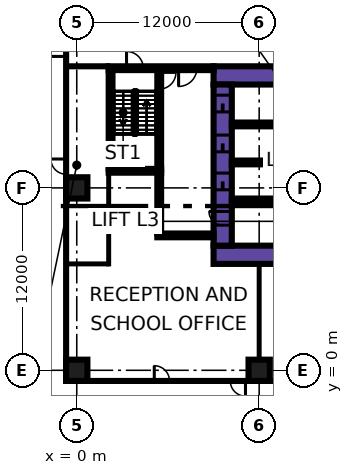
"""IFC4 building model, lengths in metres.
Left out: names, types, materials, properties, quantities, classifications, styles, units other than length and angle.
Written with IfcOpenShell. Run it as: python <this file> out.ifc"""

import sys

from ifc_helpers import new_model, si_unit, direction, frame, frame_2d, origin, origin_2d, place, context, subcontext, project, spatial, rectangle, extrude, element, fill, save


model = new_model("IFC4")
c1 = context("Model", 3, precision=1e-05, world=origin(), true_north=direction((0.0, 1.0)))
c2 = subcontext(c1, "Body", "Model", "MODEL_VIEW")
j1 = project(units=[si_unit("LENGTHUNIT", "METRE"), si_unit("PLANEANGLEUNIT", "RADIAN")], contexts=[c1])
p1 = place(None, origin())
s1 = spatial("IfcSite", under=j1, at=p1, CompositionType="ELEMENT")
p2 = place(p1, origin())
s2 = spatial("IfcBuilding", under=s1, at=p2, CompositionType="ELEMENT")
p3 = place(p2, origin())
s3 = spatial("IfcBuildingStorey", under=s2, at=p3, CompositionType="ELEMENT", Elevation=0.0)
for number, where, z_axis, x_axis in (
    (1, (0.0, 0.0, 0.0), (0.0, 0.0, 1.0), (1.0, 0.0, 0.0)),
    (2, (12.0, 0.0, 0.0), (0.0, 0.0, 1.0), (1.0, 0.0, 0.0)),
    (3, (0.0, 12.0, 0.0), (0.0, 0.0, 1.0), (1.0, 0.0, 0.0)),
):
    element("IfcColumn", number, at=place(p3, frame(where, z_axis=z_axis, x_axis=x_axis)), inside=s3, PredefinedType="COLUMN", context=c2, shape_type="SweptSolid", body=[
        extrude(rectangle(XDim=1.4, YDim=1.4, at=origin_2d()), origin(), (0.0, 0.0, 1.0), 7.2),
    ])
p4 = place(p3, frame((9.0, 7.6, 0.0), z_axis=(0.0, 0.0, 1.0), x_axis=(1.0, 0.0, 0.0)))
e4 = element("IfcWall", 4, at=p4, inside=s3, PredefinedType="SHEAR", context=c2, shape_type="SweptSolid", body=[
    extrude(rectangle(XDim=25.0, YDim=1.2, at=frame_2d((12.5, 0.0))), origin(), (0.0, 0.0, 1.0), 7.2),
])
p5 = place(p3, frame((9.0, 19.4, 0.0), z_axis=(0.0, 0.0, 1.0), x_axis=(1.0, 0.0, 0.0)))
e5 = element("IfcWall", 5, at=p5, inside=s3, PredefinedType="SHEAR", context=c2, shape_type="SweptSolid", body=[
    extrude(rectangle(XDim=25.0, YDim=1.2, at=frame_2d((12.5, 0.0))), origin(), (0.0, 0.0, 1.0), 7.2),
])
p6 = place(p5, frame((19.1, 0.0, 0.0)))
e6 = element("IfcOpeningElement", 6, at=p6, cuts=e5, PredefinedType="OPENING", context=c2, shape_type="SweptSolid", body=[
    extrude(rectangle(XDim=1.8, YDim=2.4, at=frame_2d((0.9, 1.2))), frame((0.0, 0.61, 0.0), z_axis=(0.0, -1.0, 0.0), x_axis=(1.0, 0.0, 0.0)), (0.0, 0.0, 1.0), 1.22),
])
p7 = place(p3, frame((9.6, 8.2, 0.0), z_axis=(0.0, 0.0, 1.0), x_axis=(0.0, 1.0, 0.0)))
e7 = element("IfcWall", 7, at=p7, inside=s3, PredefinedType="SHEAR", context=c2, shape_type="SweptSolid", body=[
    extrude(rectangle(XDim=10.6, YDim=1.2, at=frame_2d((5.3, 0.0))), origin(), (0.0, 0.0, 1.0), 7.2),
])
p8 = place(p7, frame((3.675, 0.0, 0.0)))
e8 = element("IfcOpeningElement", 8, at=p8, cuts=e7, PredefinedType="OPENING", context=c2, shape_type="SweptSolid", body=[
    extrude(rectangle(XDim=1.1, YDim=2.2, at=frame_2d((0.55, 1.1))), frame((0.0, 0.61, 0.0), z_axis=(0.0, -1.0, 0.0), x_axis=(1.0, 0.0, 0.0)), (0.0, 0.0, 1.0), 1.22),
])
p9 = place(p7, frame((6.175, 0.0, 0.0)))
e9 = element("IfcOpeningElement", 9, at=p9, cuts=e7, PredefinedType="OPENING", context=c2, shape_type="SweptSolid", body=[
    extrude(rectangle(XDim=1.1, YDim=2.2, at=frame_2d((0.55, 1.1))), frame((0.0, 0.61, 0.0), z_axis=(0.0, -1.0, 0.0), x_axis=(1.0, 0.0, 0.0)), (0.0, 0.0, 1.0), 1.22),
])
p10 = place(p7, frame((8.8, 0.0, 0.0)))
e10 = element("IfcOpeningElement", 10, at=p10, cuts=e7, PredefinedType="OPENING", context=c2, shape_type="SweptSolid", body=[
    extrude(rectangle(XDim=1.1, YDim=2.2, at=frame_2d((0.55, 1.1))), frame((0.0, 0.61, 0.0), z_axis=(0.0, -1.0, 0.0), x_axis=(1.0, 0.0, 0.0)), (0.0, 0.0, 1.0), 1.22),
])
p11 = place(p7, frame((1.35, 0.0, 0.0)))
e11 = element("IfcOpeningElement", 11, at=p11, cuts=e7, PredefinedType="OPENING", context=c2, shape_type="SweptSolid", body=[
    extrude(rectangle(XDim=0.9, YDim=2.1, at=frame_2d((0.45, 1.05))), frame((0.0, 0.61, 0.0), z_axis=(0.0, -1.0, 0.0), x_axis=(1.0, 0.0, 0.0)), (0.0, 0.0, 1.0), 1.22),
])
for number, where, z_axis, x_axis in (
    (12, (10.2, 11.175, 0.0), (0.0, 0.0, 1.0), (1.0, 0.0, 0.0)),
    (13, (10.2, 13.675, 0.0), (0.0, 0.0, 1.0), (1.0, 0.0, 0.0)),
    (14, (10.2, 16.175, 0.0), (0.0, 0.0, 1.0), (1.0, 0.0, 0.0)),
):
    element("IfcWall", number, at=place(p3, frame(where, z_axis=z_axis, x_axis=x_axis)), inside=s3, PredefinedType="SHEAR", context=c2, shape_type="SweptSolid", body=[
        extrude(rectangle(XDim=3.0, YDim=0.25, at=frame_2d((1.5, 0.0))), origin(), (0.0, 0.0, 1.0), 7.2),
    ])
p12 = place(p3, frame((2.1, 19.875, 0.0), z_axis=(0.0, 0.0, 1.0), x_axis=(1.0, 0.0, 0.0)))
e15 = element("IfcWall", 15, at=p12, inside=s3, PredefinedType="SHEAR", context=c2, shape_type="SweptSolid", body=[
    extrude(rectangle(XDim=6.9, YDim=0.25, at=frame_2d((3.45, 0.0))), origin(), (0.0, 0.0, 1.0), 7.2),
])
p13 = place(p12, frame((1.175, 0.0, 0.0)))
e16 = element("IfcOpeningElement", 16, at=p13, cuts=e15, PredefinedType="OPENING", context=c2, shape_type="SweptSolid", body=[
    extrude(rectangle(XDim=1.1, YDim=2.2, at=frame_2d((0.55, 1.1))), frame((0.0, 0.135, 0.0), z_axis=(0.0, -1.0, 0.0), x_axis=(1.0, 0.0, 0.0)), (0.0, 0.0, 1.0), 0.27),
])
p14 = place(p12, frame((4.6, 0.0, 0.0)))
e17 = element("IfcOpeningElement", 17, at=p14, cuts=e15, PredefinedType="OPENING", context=c2, shape_type="SweptSolid", body=[
    extrude(rectangle(XDim=1.2, YDim=2.2, at=frame_2d((0.6, 1.1))), frame((0.0, 0.135, 0.0), z_axis=(0.0, -1.0, 0.0), x_axis=(1.0, 0.0, 0.0)), (0.0, 0.0, 1.0), 0.27),
])
p15 = place(p3, frame((2.1, 13.125, 0.0), z_axis=(0.0, 0.0, 1.0), x_axis=(1.0, 0.0, 0.0)))
e18 = element("IfcWall", 18, at=p15, inside=s3, PredefinedType="SHEAR", context=c2, shape_type="SweptSolid", body=[
    extrude(rectangle(XDim=3.45, YDim=0.25, at=frame_2d((1.725, 0.0))), origin(), (0.0, 0.0, 1.0), 7.2),
])
p16 = place(p3, frame((2.225, 13.25, 0.0), z_axis=(0.0, 0.0, 1.0), x_axis=(0.0, 1.0, 0.0)))
e19 = element("IfcWall", 19, at=p16, inside=s3, PredefinedType="SHEAR", context=c2, shape_type="SweptSolid", body=[
    extrude(rectangle(XDim=6.5, YDim=0.25, at=frame_2d((3.25, 0.0))), origin(), (0.0, 0.0, 1.0), 7.2),
])
p17 = place(p3, frame((5.425, 13.25, 0.0), z_axis=(0.0, 0.0, 1.0), x_axis=(0.0, 1.0, 0.0)))
e20 = element("IfcWall", 20, at=p17, inside=s3, PredefinedType="SHEAR", context=c2, shape_type="SweptSolid", body=[
    extrude(rectangle(XDim=6.5, YDim=0.25, at=frame_2d((3.25, 0.0))), origin(), (0.0, 0.0, 1.0), 7.2),
])
p18 = place(p17, frame((5.25, 0.0, 0.0)))
e21 = element("IfcOpeningElement", 21, at=p18, cuts=e20, PredefinedType="OPENING", context=c2, shape_type="SweptSolid", body=[
    extrude(rectangle(XDim=1.1, YDim=2.2, at=frame_2d((0.55, 1.1))), frame((0.0, 0.135, 0.0), z_axis=(0.0, -1.0, 0.0), x_axis=(1.0, 0.0, 0.0)), (0.0, 0.0, 1.0), 0.27),
])
p19 = place(p3, frame((5.3, 8.875, 0.0), z_axis=(0.0, 0.0, 1.0), x_axis=(1.0, 0.0, 0.0)))
e22 = element("IfcWall", 22, at=p19, inside=s3, PredefinedType="SHEAR", context=c2, shape_type="SweptSolid", body=[
    extrude(rectangle(XDim=3.7, YDim=0.25, at=frame_2d((1.85, 0.0))), origin(), (0.0, 0.0, 1.0), 7.2),
])
p20 = place(p3, frame((5.425, 9.0, 0.0), z_axis=(0.0, 0.0, 1.0), x_axis=(0.0, 1.0, 0.0)))
e23 = element("IfcWall", 23, at=p20, inside=s3, PredefinedType="SHEAR", context=c2, shape_type="SweptSolid", body=[
    extrude(rectangle(XDim=4.0, YDim=0.25, at=frame_2d((2.0, 0.0))), origin(), (0.0, 0.0, 1.0), 7.2),
])
p21 = place(p3, frame((-0.8, -0.7, 0.0), z_axis=(0.0, 0.0, 1.0), x_axis=(1.0, 0.0, 0.0)))
e24 = element("IfcWall", 24, at=p21, inside=s3, PredefinedType="PARTITIONING", context=c2, shape_type="SweptSolid", body=[
    extrude(rectangle(XDim=46.5, YDim=0.2, at=frame_2d((23.25, 0.0))), origin(), (0.0, 0.0, 1.0), 6.8),
])
p22 = place(p21, frame((39.85, 0.0, 0.0)))
e25 = element("IfcOpeningElement", 25, at=p22, cuts=e24, PredefinedType="OPENING", context=c2, shape_type="SweptSolid", body=[
    extrude(rectangle(XDim=1.8, YDim=2.1, at=frame_2d((0.9, 1.05))), frame((0.0, 0.11, 0.0), z_axis=(0.0, -1.0, 0.0), x_axis=(1.0, 0.0, 0.0)), (0.0, 0.0, 1.0), 0.22),
])
p23 = place(p21, frame((5.9, 0.0, 0.0)))
e26 = element("IfcOpeningElement", 26, at=p23, cuts=e24, PredefinedType="OPENING", context=c2, shape_type="SweptSolid", body=[
    extrude(rectangle(XDim=1.0, YDim=2.1, at=frame_2d((0.5, 1.05))), frame((0.0, 0.11, 0.0), z_axis=(0.0, -1.0, 0.0), x_axis=(1.0, 0.0, 0.0)), (0.0, 0.0, 1.0), 0.22),
])
p24 = place(p21, frame((10.9, 0.0, 0.0)))
e27 = element("IfcOpeningElement", 27, at=p24, cuts=e24, PredefinedType="OPENING", context=c2, shape_type="SweptSolid", body=[
    extrude(rectangle(XDim=1.0, YDim=2.1, at=frame_2d((0.5, 1.05))), frame((0.0, 0.11, 0.0), z_axis=(0.0, -1.0, 0.0), x_axis=(1.0, 0.0, 0.0)), (0.0, 0.0, 1.0), 0.22),
])
p25 = place(p21, frame((18.4, 0.0, 0.0)))
e28 = element("IfcOpeningElement", 28, at=p25, cuts=e24, PredefinedType="OPENING", context=c2, shape_type="SweptSolid", body=[
    extrude(rectangle(XDim=1.0, YDim=2.1, at=frame_2d((0.5, 1.05))), frame((0.0, 0.11, 0.0), z_axis=(0.0, -1.0, 0.0), x_axis=(1.0, 0.0, 0.0)), (0.0, 0.0, 1.0), 0.22),
])
p26 = place(p21, frame((29.4, 0.0, 0.0)))
e29 = element("IfcOpeningElement", 29, at=p26, cuts=e24, PredefinedType="OPENING", context=c2, shape_type="SweptSolid", body=[
    extrude(rectangle(XDim=1.0, YDim=2.1, at=frame_2d((0.5, 1.05))), frame((0.0, 0.11, 0.0), z_axis=(0.0, -1.0, 0.0), x_axis=(1.0, 0.0, 0.0)), (0.0, 0.0, 1.0), 0.22),
])
p27 = place(p3, frame((-0.7, -0.6, 0.0), z_axis=(0.0, 0.0, 1.0), x_axis=(0.0, 1.0, 0.0)))
e30 = element("IfcWall", 30, at=p27, inside=s3, PredefinedType="PARTITIONING", context=c2, shape_type="SweptSolid", body=[
    extrude(rectangle(XDim=23.6, YDim=0.2, at=frame_2d((11.8, 0.0))), origin(), (0.0, 0.0, 1.0), 6.8),
])
p28 = place(p27, frame((21.25, 0.0, 0.0)))
e31 = element("IfcOpeningElement", 31, at=p28, cuts=e30, PredefinedType="OPENING", context=c2, shape_type="SweptSolid", body=[
    extrude(rectangle(XDim=1.8, YDim=2.1, at=frame_2d((0.9, 1.05))), frame((0.0, 0.11, 0.0), z_axis=(0.0, -1.0, 0.0), x_axis=(1.0, 0.0, 0.0)), (0.0, 0.0, 1.0), 0.22),
])
p29 = place(p27, frame((13.5, 0.0, 0.0)))
e32 = element("IfcOpeningElement", 32, at=p29, cuts=e30, PredefinedType="OPENING", context=c2, shape_type="SweptSolid", body=[
    extrude(rectangle(XDim=1.0, YDim=2.1, at=frame_2d((0.5, 1.05))), frame((0.0, 0.11, 0.0), z_axis=(0.0, -1.0, 0.0), x_axis=(1.0, 0.0, 0.0)), (0.0, 0.0, 1.0), 0.22),
])
p30 = place(p3, frame((-0.6, 7.0, 0.0), z_axis=(0.0, 0.0, 1.0), x_axis=(1.0, 0.0, 0.0)))
e33 = element("IfcWall", 33, at=p30, inside=s3, PredefinedType="PARTITIONING", context=c2, shape_type="SweptSolid", body=[
    extrude(rectangle(XDim=2.638, YDim=0.125, at=frame_2d((1.319, 0.0))), origin(), (0.0, 0.0, 1.0), 6.8),
])
p31 = place(p3, frame((-0.6, 20.0, 0.0), z_axis=(0.0, 0.0, 1.0), x_axis=(1.0, 0.0, 0.0)))
e34 = element("IfcWall", 34, at=p31, inside=s3, PredefinedType="PARTITIONING", context=c2, shape_type="SweptSolid", body=[
    extrude(rectangle(XDim=2.7, YDim=0.2, at=frame_2d((1.35, 0.0))), origin(), (0.0, 0.0, 1.0), 6.8),
])
p32 = place(p3, frame((2.1, 6.938, 0.0), z_axis=(0.0, 0.0, 1.0), x_axis=(0.0, 1.0, 0.0)))
e35 = element("IfcWall", 35, at=p32, inside=s3, PredefinedType="PARTITIONING", context=c2, shape_type="SweptSolid", body=[
    extrude(rectangle(XDim=6.062, YDim=0.125, at=frame_2d((3.031, 0.0))), origin(), (0.0, 0.0, 1.0), 6.8),
])
p33 = place(p3, frame((12.0, -0.6, 0.0), z_axis=(0.0, 0.0, 1.0), x_axis=(0.0, 1.0, 0.0)))
e36 = element("IfcWall", 36, at=p33, inside=s3, PredefinedType="PARTITIONING", context=c2, shape_type="SweptSolid", body=[
    extrude(rectangle(XDim=7.6, YDim=0.125, at=frame_2d((3.8, 0.0))), origin(), (0.0, 0.0, 1.0), 6.8),
])
p34 = place(p8, origin())
e37 = element("IfcDoor", 37, at=p34, inside=s3, OperationType="DOUBLE_DOOR_SLIDING", PredefinedType="DOOR", context=c2, shape_type="SweptSolid", body=[
    extrude(rectangle(XDim=1.1, YDim=2.2, at=frame_2d((0.55, 1.1))), frame((0.0, 0.025, 0.0), z_axis=(0.0, -1.0, 0.0), x_axis=(1.0, 0.0, 0.0)), (0.0, 0.0, 1.0), 0.05),
])
fill(e8, e37)
p35 = place(p9, origin())
e38 = element("IfcDoor", 38, at=p35, inside=s3, OperationType="DOUBLE_DOOR_SLIDING", PredefinedType="DOOR", context=c2, shape_type="SweptSolid", body=[
    extrude(rectangle(XDim=1.1, YDim=2.2, at=frame_2d((0.55, 1.1))), frame((0.0, 0.025, 0.0), z_axis=(0.0, -1.0, 0.0), x_axis=(1.0, 0.0, 0.0)), (0.0, 0.0, 1.0), 0.05),
])
fill(e9, e38)
p36 = place(p10, origin())
e39 = element("IfcDoor", 39, at=p36, inside=s3, OperationType="DOUBLE_DOOR_SLIDING", PredefinedType="DOOR", context=c2, shape_type="SweptSolid", body=[
    extrude(rectangle(XDim=1.1, YDim=2.2, at=frame_2d((0.55, 1.1))), frame((0.0, 0.025, 0.0), z_axis=(0.0, -1.0, 0.0), x_axis=(1.0, 0.0, 0.0)), (0.0, 0.0, 1.0), 0.05),
])
fill(e10, e39)
p37 = place(p18, origin())
e40 = element("IfcDoor", 40, at=p37, inside=s3, OperationType="SINGLE_SWING_RIGHT", PredefinedType="DOOR", context=c2, shape_type="SweptSolid", body=[
    extrude(rectangle(XDim=1.1, YDim=2.2, at=frame_2d((0.55, 1.1))), frame((0.0, 0.025, 0.0), z_axis=(0.0, -1.0, 0.0), x_axis=(1.0, 0.0, 0.0)), (0.0, 0.0, 1.0), 0.05),
])
fill(e21, e40)
p38 = place(p11, frame((0.9, 0.0, 0.0), z_axis=(0.0, 0.0, 1.0), x_axis=(-1.0, 0.0, 0.0)))
e41 = element("IfcDoor", 41, at=p38, inside=s3, OperationType="SINGLE_SWING_RIGHT", PredefinedType="DOOR", context=c2, shape_type="SweptSolid", body=[
    extrude(rectangle(XDim=0.9, YDim=2.1, at=frame_2d((0.45, 1.05))), frame((0.0, 0.025, 0.0), z_axis=(0.0, -1.0, 0.0), x_axis=(1.0, 0.0, 0.0)), (0.0, 0.0, 1.0), 0.05),
])
fill(e11, e41)
p39 = place(p13, origin())
e42 = element("IfcDoor", 42, at=p39, inside=s3, OperationType="SINGLE_SWING_LEFT", PredefinedType="DOOR", context=c2, shape_type="SweptSolid", body=[
    extrude(rectangle(XDim=1.1, YDim=2.2, at=frame_2d((0.55, 1.1))), frame((0.0, 0.025, 0.0), z_axis=(0.0, -1.0, 0.0), x_axis=(1.0, 0.0, 0.0)), (0.0, 0.0, 1.0), 0.05),
])
fill(e16, e42)
p40 = place(p14, frame((1.2, 0.0, 0.0), z_axis=(0.0, 0.0, 1.0), x_axis=(-1.0, 0.0, 0.0)))
e43 = element("IfcDoor", 43, at=p40, inside=s3, OperationType="SINGLE_SWING_LEFT", PredefinedType="DOOR", context=c2, shape_type="SweptSolid", body=[
    extrude(rectangle(XDim=1.2, YDim=2.2, at=frame_2d((0.6, 1.1))), frame((0.0, 0.025, 0.0), z_axis=(0.0, -1.0, 0.0), x_axis=(1.0, 0.0, 0.0)), (0.0, 0.0, 1.0), 0.05),
])
fill(e17, e43)
p41 = place(p28, origin())
e44 = element("IfcDoor", 44, at=p41, inside=s3, OperationType="DOUBLE_DOOR_SINGLE_SWING", PredefinedType="DOOR", context=c2, shape_type="SweptSolid", body=[
    extrude(rectangle(XDim=1.8, YDim=2.1, at=frame_2d((0.9, 1.05))), frame((0.0, 0.025, 0.0), z_axis=(0.0, -1.0, 0.0), x_axis=(1.0, 0.0, 0.0)), (0.0, 0.0, 1.0), 0.05),
])
fill(e31, e44)
p42 = place(p29, frame((1.0, 0.0, 0.0), z_axis=(0.0, 0.0, 1.0), x_axis=(-1.0, 0.0, 0.0)))
e45 = element("IfcDoor", 45, at=p42, inside=s3, OperationType="SINGLE_SWING_RIGHT", PredefinedType="DOOR", context=c2, shape_type="SweptSolid", body=[
    extrude(rectangle(XDim=1.0, YDim=2.1, at=frame_2d((0.5, 1.05))), frame((0.0, 0.025, 0.0), z_axis=(0.0, -1.0, 0.0), x_axis=(1.0, 0.0, 0.0)), (0.0, 0.0, 1.0), 0.05),
])
fill(e32, e45)
p43 = place(p23, origin())
e46 = element("IfcDoor", 46, at=p43, inside=s3, OperationType="SINGLE_SWING_LEFT", PredefinedType="DOOR", context=c2, shape_type="SweptSolid", body=[
    extrude(rectangle(XDim=1.0, YDim=2.1, at=frame_2d((0.5, 1.05))), frame((0.0, 0.025, 0.0), z_axis=(0.0, -1.0, 0.0), x_axis=(1.0, 0.0, 0.0)), (0.0, 0.0, 1.0), 0.05),
])
fill(e26, e46)
p44 = place(p24, origin())
e47 = element("IfcDoor", 47, at=p44, inside=s3, OperationType="SINGLE_SWING_RIGHT", PredefinedType="DOOR", context=c2, shape_type="SweptSolid", body=[
    extrude(rectangle(XDim=1.0, YDim=2.1, at=frame_2d((0.5, 1.05))), frame((0.0, 0.025, 0.0), z_axis=(0.0, -1.0, 0.0), x_axis=(1.0, 0.0, 0.0)), (0.0, 0.0, 1.0), 0.05),
])
fill(e27, e47)
save(model, sys.argv[1])
